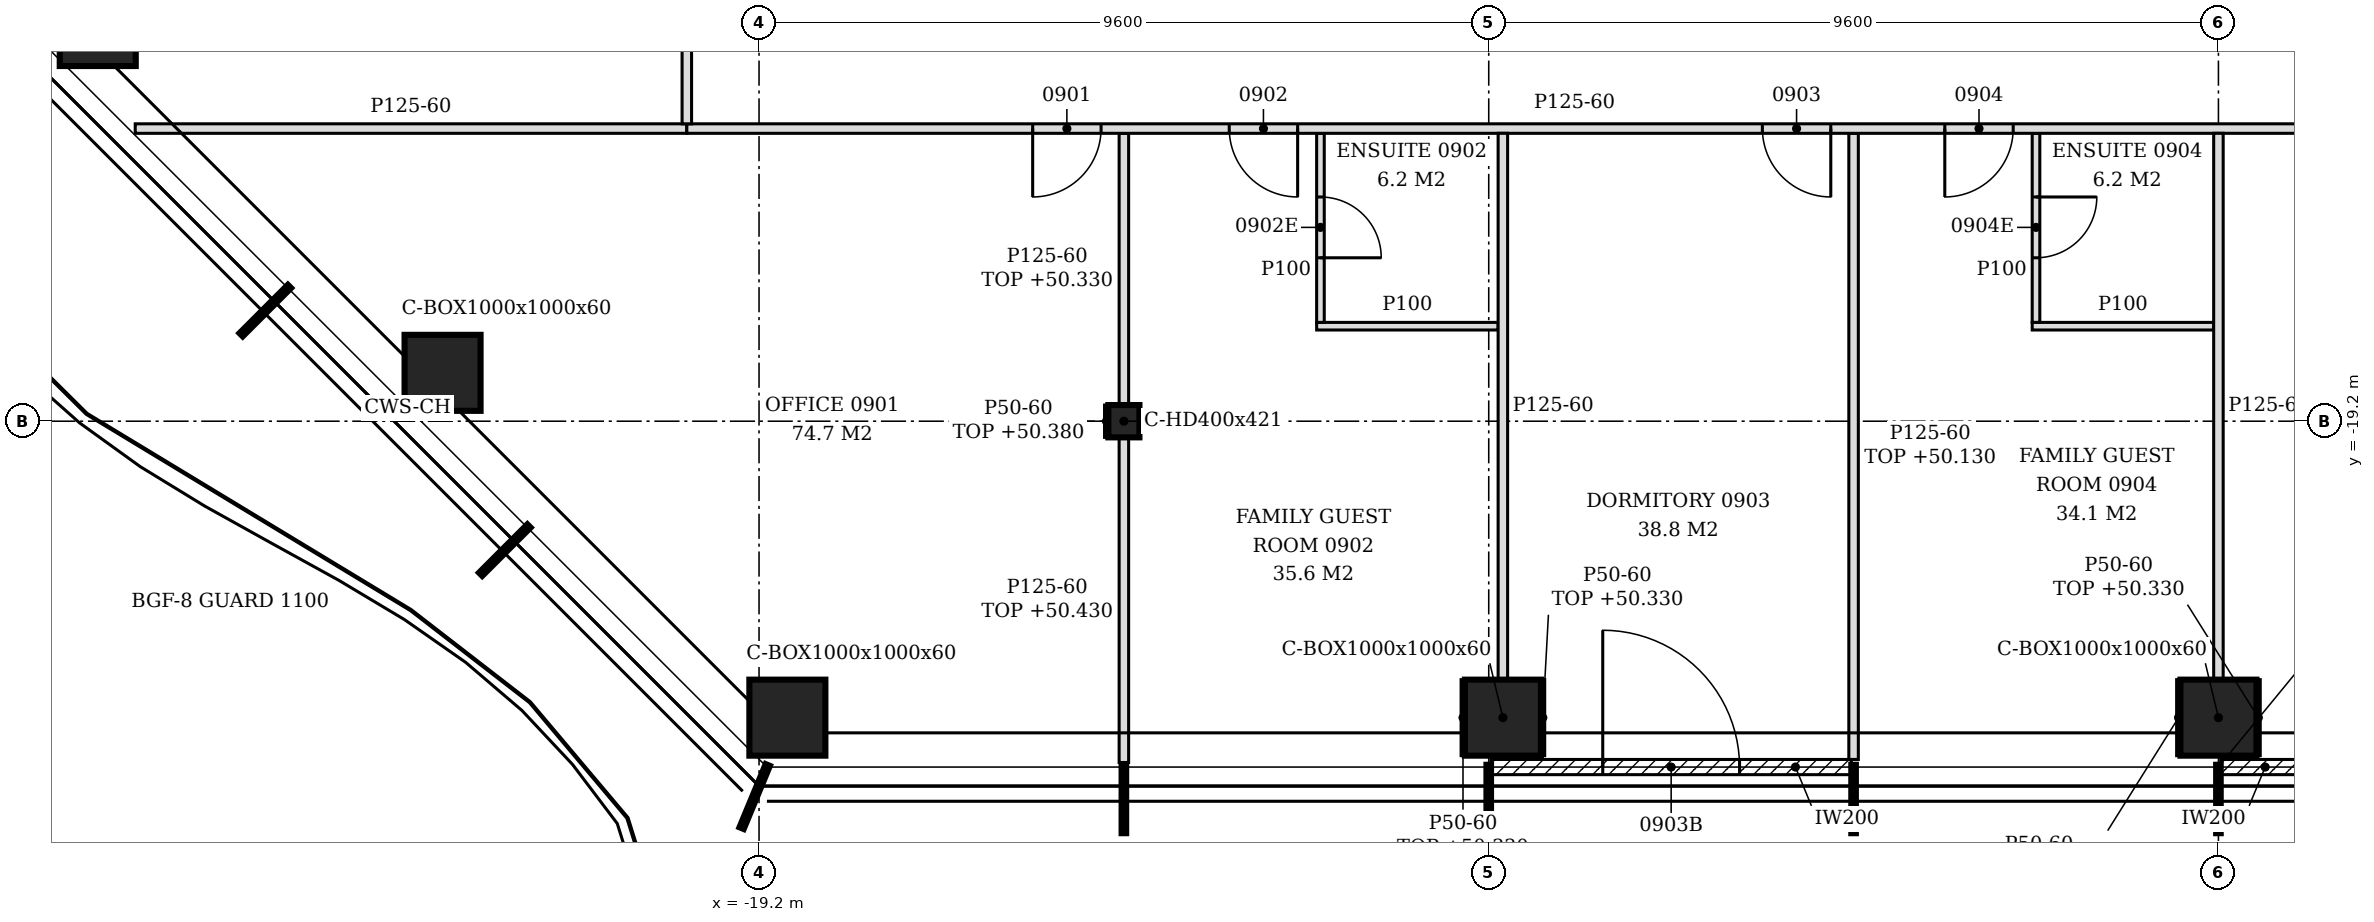
"""IFC4 building model, lengths in metres.
Left out: names, types, materials, properties, quantities, classifications, styles, units other than length and angle.
Written with IfcOpenShell. Run it as: python <this file> out.ifc"""

import sys

from ifc_helpers import new_model, si_unit, direction, frame, frame_2d, origin, origin_2d, place, context, subcontext, project, spatial, polyline, rectangle, hollow_rectangle, i_section, outline, extrude, element, fill, save


model = new_model("IFC4")
c1 = context("Model", 3, precision=1e-05, world=origin(), true_north=direction((0.0, 1.0)))
c2 = subcontext(c1, "Body", "Model", "MODEL_VIEW")
j1 = project(units=[si_unit("LENGTHUNIT", "METRE"), si_unit("PLANEANGLEUNIT", "RADIAN")], contexts=[c1])
p1 = place(None, origin())
s1 = spatial("IfcSite", under=j1, at=p1, CompositionType="ELEMENT")
p2 = place(p1, origin())
s2 = spatial("IfcBuilding", under=s1, at=p2, CompositionType="ELEMENT")
p3 = place(p2, frame((0.0, 0.0, 47.4)))
s3 = spatial("IfcBuildingStorey", under=s2, at=p3, CompositionType="ELEMENT", Elevation=47.4)
for number, where, z_axis, x_axis in (
    (1, (-18.827, -23.1, -0.15), (0.0, 0.0, 1.0), (1.0, 0.0, 0.0)),
    (2, (-9.414, -23.1, -0.15), (0.0, 0.0, 1.0), (1.0, 0.0, 0.0)),
    (3, (0.0, -23.1, -0.15), (0.0, 0.0, 1.0), (1.0, 0.0, 0.0)),
    (4, (-27.9, -14.027, -0.15), (0.0, 0.0, 1.0), (1.0, 0.0, 0.0)),
    (5, (-23.364, -18.564, -0.15), (0.0, 0.0, 1.0), (1.0, 0.0, 0.0)),
):
    element("IfcColumn", number, at=place(p3, frame(where, z_axis=z_axis, x_axis=x_axis)), inside=s3, PredefinedType="COLUMN", context=c2, shape_type="SweptSolid", body=[
        extrude(hollow_rectangle(XDim=1.0, YDim=1.0, WallThickness=0.06, at=origin_2d()), origin(), (0.0, 0.0, 1.0), 3.6),
    ])
p4 = place(p3, frame((-14.4, -19.2, -0.15), z_axis=(0.0, 0.0, 1.0), x_axis=(1.0, 0.0, 0.0)))
e6 = element("IfcColumn", 6, at=p4, inside=s3, PredefinedType="COLUMN", context=c2, shape_type="SweptSolid", body=[
    extrude(i_section(OverallWidth=0.409, OverallDepth=0.425, WebThickness=0.033, FlangeThickness=0.052, FilletRadius=0.015, at=origin_2d()), origin(), (0.0, 0.0, 1.0), 3.6),
])
p5 = place(p3, frame((-9.57, -23.75, 0.0), z_axis=(0.0, 0.0, 1.0), x_axis=(1.0, 0.0, 0.0)))
e7 = element("IfcWall", 7, at=p5, inside=s3, PredefinedType="NOTDEFINED", context=c2, shape_type="SweptSolid", body=[
    extrude(rectangle(XDim=4.74, YDim=0.2, at=frame_2d((2.37, 0.0))), origin(), (0.0, 0.0, 1.0), 3.45),
])
p6 = place(p5, frame((1.47, 0.0, 0.0)))
e8 = element("IfcOpeningElement", 8, at=p6, cuts=e7, PredefinedType="OPENING", context=c2, shape_type="SweptSolid", body=[
    extrude(rectangle(XDim=1.8, YDim=2.4, at=frame_2d((0.9, 1.2))), frame((0.0, 0.11, 0.0), z_axis=(0.0, -1.0, 0.0), x_axis=(1.0, 0.0, 0.0)), (0.0, 0.0, 1.0), 0.22),
])
p7 = place(p3, frame((0.03, -23.75, 0.0), z_axis=(0.0, 0.0, 1.0), x_axis=(1.0, 0.0, 0.0)))
e9 = element("IfcWall", 9, at=p7, inside=s3, PredefinedType="NOTDEFINED", context=c2, shape_type="SweptSolid", body=[
    extrude(rectangle(XDim=4.74, YDim=0.2, at=frame_2d((2.37, 0.0))), origin(), (0.0, 0.0, 1.0), 3.45),
])
p8 = place(p7, frame((1.17, 0.0, 0.0)))
e10 = element("IfcOpeningElement", 10, at=p8, cuts=e9, PredefinedType="OPENING", context=c2, shape_type="SweptSolid", body=[
    extrude(rectangle(XDim=2.4, YDim=2.4, at=frame_2d((1.2, 1.2))), frame((0.0, 0.11, 0.0), z_axis=(0.0, -1.0, 0.0), x_axis=(1.0, 0.0, 0.0)), (0.0, 0.0, 1.0), 0.22),
])
p9 = place(p3, frame((-14.4, -23.69, 0.0), z_axis=(0.0, 0.0, 1.0), x_axis=(0.0, 1.0, 0.0)))
e11 = element("IfcWall", 11, at=p9, inside=s3, PredefinedType="PARTITIONING", context=c2, shape_type="SweptSolid", body=[
    extrude(outline(polyline([(0.0, 0.0), (4.277, 0.0), (4.278, 3.03), (0.74, 3.03), (0.738, 2.93), (0.44, 2.93), (0.438, 3.03), (0.0, 3.03), (0.0, 0.0)])), frame((0.0, 0.062, 0.0), z_axis=(0.0, -1.0, 0.0), x_axis=(1.0, 0.0, 0.0)), (0.0, 0.0, 1.0), 0.125),
])
p10 = place(p3, frame((-4.8, -23.65, 0.0), z_axis=(0.0, 0.0, 1.0), x_axis=(0.0, 1.0, 0.0)))
e12 = element("IfcWall", 12, at=p10, inside=s3, PredefinedType="PARTITIONING", context=c2, shape_type="SweptSolid", body=[
    extrude(rectangle(XDim=8.237, YDim=0.125, at=frame_2d((4.119, 0.0))), origin(), (0.0, 0.0, 1.0), 2.73),
])
p11 = place(p3, frame((-9.414, -22.6, 0.0), z_axis=(0.0, 0.0, 1.0), x_axis=(0.0, 1.0, 0.0)))
e13 = element("IfcWall", 13, at=p11, inside=s3, PredefinedType="PARTITIONING", context=c2, shape_type="SweptSolid", body=[
    extrude(outline(polyline([(0.0, 0.0), (7.188, 0.0), (7.188, 3.45), (3.5, 3.45), (3.498, 2.93), (3.3, 2.93), (3.298, 3.45), (0.0, 3.45), (0.0, 0.0)])), frame((0.0, 0.062, 0.0), z_axis=(0.0, -1.0, 0.0), x_axis=(1.0, 0.0, 0.0)), (0.0, 0.0, 1.0), 0.125),
])
p12 = place(p3, frame((0.0, -22.6, 0.0), z_axis=(0.0, 0.0, 1.0), x_axis=(0.0, 1.0, 0.0)))
e14 = element("IfcWall", 14, at=p12, inside=s3, PredefinedType="PARTITIONING", context=c2, shape_type="SweptSolid", body=[
    extrude(outline(polyline([(0.0, 0.0), (7.188, 0.0), (7.188, 3.45), (3.505, 3.45), (3.503, 2.88), (3.295, 2.88), (3.293, 3.45), (0.0, 3.45), (0.0, 0.0)])), frame((0.0, 0.062, 0.0), z_axis=(0.0, -1.0, 0.0), x_axis=(1.0, 0.0, 0.0)), (0.0, 0.0, 1.0), 0.125),
])
p13 = place(p3, frame((-14.4, -18.988, 0.0), z_axis=(0.0, 0.0, 1.0), x_axis=(0.0, 1.0, 0.0)))
e15 = element("IfcWall", 15, at=p13, inside=s3, PredefinedType="PARTITIONING", context=c2, shape_type="SweptSolid", body=[
    extrude(rectangle(XDim=3.575, YDim=0.125, at=frame_2d((1.788, 0.0))), origin(), (0.0, 0.0, 1.0), 2.93),
])
p14 = place(p3, frame((-11.864, -17.95, 0.0), z_axis=(0.0, 0.0, 1.0), x_axis=(1.0, 0.0, 0.0)))
e16 = element("IfcWall", 16, at=p14, inside=s3, PredefinedType="PARTITIONING", context=c2, shape_type="SweptSolid", body=[
    extrude(rectangle(XDim=2.387, YDim=0.1, at=frame_2d((1.194, 0.0))), origin(), (0.0, 0.0, 1.0), 3.45),
])
p15 = place(p3, frame((-11.814, -17.9, 0.0), z_axis=(0.0, 0.0, 1.0), x_axis=(0.0, 1.0, 0.0)))
e17 = element("IfcWall", 17, at=p15, inside=s3, PredefinedType="PARTITIONING", context=c2, shape_type="SweptSolid", body=[
    extrude(rectangle(XDim=2.487, YDim=0.1, at=frame_2d((1.244, 0.0))), origin(), (0.0, 0.0, 1.0), 3.45),
])
p16 = place(p15, frame((0.85, 0.0, 0.0)))
e18 = element("IfcOpeningElement", 18, at=p16, cuts=e17, PredefinedType="OPENING", context=c2, shape_type="SweptSolid", body=[
    extrude(rectangle(XDim=0.8, YDim=2.1, at=frame_2d((0.4, 1.05))), frame((0.0, 0.06, 0.0), z_axis=(0.0, -1.0, 0.0), x_axis=(1.0, 0.0, 0.0)), (0.0, 0.0, 1.0), 0.12),
])
p17 = place(p3, frame((-2.45, -17.95, 0.0), z_axis=(0.0, 0.0, 1.0), x_axis=(1.0, 0.0, 0.0)))
e19 = element("IfcWall", 19, at=p17, inside=s3, PredefinedType="PARTITIONING", context=c2, shape_type="SweptSolid", body=[
    extrude(rectangle(XDim=2.387, YDim=0.1, at=frame_2d((1.194, 0.0))), origin(), (0.0, 0.0, 1.0), 3.45),
])
p18 = place(p3, frame((-2.4, -17.9, 0.0), z_axis=(0.0, 0.0, 1.0), x_axis=(0.0, 1.0, 0.0)))
e20 = element("IfcWall", 20, at=p18, inside=s3, PredefinedType="PARTITIONING", context=c2, shape_type="SweptSolid", body=[
    extrude(rectangle(XDim=2.487, YDim=0.1, at=frame_2d((1.244, 0.0))), origin(), (0.0, 0.0, 1.0), 3.45),
])
p19 = place(p18, frame((0.85, 0.0, 0.0)))
e21 = element("IfcOpeningElement", 21, at=p19, cuts=e20, PredefinedType="OPENING", context=c2, shape_type="SweptSolid", body=[
    extrude(rectangle(XDim=0.8, YDim=2.1, at=frame_2d((0.4, 1.05))), frame((0.0, 0.06, 0.0), z_axis=(0.0, -1.0, 0.0), x_axis=(1.0, 0.0, 0.0)), (0.0, 0.0, 1.0), 0.12),
])
p20 = place(p3, frame((-27.407, -15.35, 0.0), z_axis=(0.0, 0.0, 1.0), x_axis=(1.0, 0.0, 0.0)))
e22 = element("IfcWall", 22, at=p20, inside=s3, PredefinedType="PARTITIONING", context=c2, shape_type="SweptSolid", body=[
    extrude(outline(polyline([(0.0, 0.0), (7.257, 0.0), (7.257, 3.45), (1.104, 3.45), (1.102, 2.93), (0.555, 2.93), (0.553, 3.45), (0.0, 3.45), (0.0, 0.0)])), frame((0.0, 0.062, 0.0), z_axis=(0.0, -1.0, 0.0), x_axis=(1.0, 0.0, 0.0)), (0.0, 0.0, 1.0), 0.125),
])
p21 = place(p3, frame((-20.15, -15.35, 0.0), z_axis=(0.0, 0.0, 1.0), x_axis=(1.0, 0.0, 0.0)))
e23 = element("IfcWall", 23, at=p21, inside=s3, PredefinedType="PARTITIONING", context=c2, shape_type="SweptSolid", body=[
    extrude(outline(polyline([(0.0, 0.0), (39.287, 0.0), (39.288, 2.73), (39.2, 2.73), (39.198, 3.45), (27.5, 3.45), (27.498, 2.73), (27.2, 2.73), (27.198, 3.45), (15.5, 3.45), (15.498, 2.73), (15.2, 2.73), (15.198, 3.45), (5.9, 3.45), (5.898, 2.93), (5.6, 2.93), (5.598, 3.45), (0.0, 3.45), (0.0, 0.0)])), frame((0.0, 0.062, 0.0), z_axis=(0.0, -1.0, 0.0), x_axis=(1.0, 0.0, 0.0)), (0.0, 0.0, 1.0), 0.125),
])
p22 = place(p21, frame((4.55, 0.0, 0.0)))
e24 = element("IfcOpeningElement", 24, at=p22, cuts=e23, PredefinedType="OPENING", context=c2, shape_type="SweptSolid", body=[
    extrude(rectangle(XDim=0.9, YDim=2.1, at=frame_2d((0.45, 1.05))), frame((0.0, 0.073, 0.0), z_axis=(0.0, -1.0, 0.0), x_axis=(1.0, 0.0, 0.0)), (0.0, 0.0, 1.0), 0.145),
])
p23 = place(p21, frame((7.136, 0.0, 0.0)))
e25 = element("IfcOpeningElement", 25, at=p23, cuts=e23, PredefinedType="OPENING", context=c2, shape_type="SweptSolid", body=[
    extrude(rectangle(XDim=0.9, YDim=2.1, at=frame_2d((0.45, 1.05))), frame((0.0, 0.073, 0.0), z_axis=(0.0, -1.0, 0.0), x_axis=(1.0, 0.0, 0.0)), (0.0, 0.0, 1.0), 0.145),
])
p24 = place(p21, frame((14.15, 0.0, 0.0)))
e26 = element("IfcOpeningElement", 26, at=p24, cuts=e23, PredefinedType="OPENING", context=c2, shape_type="SweptSolid", body=[
    extrude(rectangle(XDim=0.9, YDim=2.1, at=frame_2d((0.45, 1.05))), frame((0.0, 0.073, 0.0), z_axis=(0.0, -1.0, 0.0), x_axis=(1.0, 0.0, 0.0)), (0.0, 0.0, 1.0), 0.145),
])
p25 = place(p21, frame((16.55, 0.0, 0.0)))
e27 = element("IfcOpeningElement", 27, at=p25, cuts=e23, PredefinedType="OPENING", context=c2, shape_type="SweptSolid", body=[
    extrude(rectangle(XDim=0.9, YDim=2.1, at=frame_2d((0.45, 1.05))), frame((0.0, 0.073, 0.0), z_axis=(0.0, -1.0, 0.0), x_axis=(1.0, 0.0, 0.0)), (0.0, 0.0, 1.0), 0.145),
])
p26 = place(p21, frame((21.35, 0.0, 0.0)))
e28 = element("IfcOpeningElement", 28, at=p26, cuts=e23, PredefinedType="OPENING", context=c2, shape_type="SweptSolid", body=[
    extrude(rectangle(XDim=0.9, YDim=2.1, at=frame_2d((0.45, 1.05))), frame((0.0, 0.073, 0.0), z_axis=(0.0, -1.0, 0.0), x_axis=(1.0, 0.0, 0.0)), (0.0, 0.0, 1.0), 0.145),
])
p27 = place(p21, frame((28.364, 0.0, 0.0)))
e29 = element("IfcOpeningElement", 29, at=p27, cuts=e23, PredefinedType="OPENING", context=c2, shape_type="SweptSolid", body=[
    extrude(rectangle(XDim=0.9, YDim=2.1, at=frame_2d((0.45, 1.05))), frame((0.0, 0.073, 0.0), z_axis=(0.0, -1.0, 0.0), x_axis=(1.0, 0.0, 0.0)), (0.0, 0.0, 1.0), 0.145),
])
p28 = place(p21, frame((32.35, 0.0, 0.0)))
e30 = element("IfcOpeningElement", 30, at=p28, cuts=e23, PredefinedType="OPENING", context=c2, shape_type="SweptSolid", body=[
    extrude(rectangle(XDim=0.9, YDim=2.1, at=frame_2d((0.45, 1.05))), frame((0.0, 0.073, 0.0), z_axis=(0.0, -1.0, 0.0), x_axis=(1.0, 0.0, 0.0)), (0.0, 0.0, 1.0), 0.145),
])
p29 = place(p21, frame((37.35, 0.0, 0.0)))
e31 = element("IfcOpeningElement", 31, at=p29, cuts=e23, PredefinedType="OPENING", context=c2, shape_type="SweptSolid", body=[
    extrude(rectangle(XDim=0.9, YDim=2.1, at=frame_2d((0.45, 1.05))), frame((0.0, 0.073, 0.0), z_axis=(0.0, -1.0, 0.0), x_axis=(1.0, 0.0, 0.0)), (0.0, 0.0, 1.0), 0.145),
])
p30 = place(p3, frame((-20.15, -15.288, 0.0), z_axis=(0.0, 0.0, 1.0), x_axis=(0.0, 1.0, 0.0)))
e32 = element("IfcWall", 32, at=p30, inside=s3, PredefinedType="PARTITIONING", context=c2, shape_type="SweptSolid", body=[
    extrude(outline(polyline([(0.0, 0.0), (37.876, 0.0), (37.876, 3.45), (37.622, 3.45), (37.62, 2.63), (36.507, 2.63), (36.505, 3.45), (34.583, 3.45), (34.581, 2.98), (34.393, 2.98), (34.39, 3.45), (29.798, 3.45), (29.795, 2.83), (29.577, 2.83), (29.575, 3.45), (24.998, 3.45), (24.996, 2.83), (24.778, 2.83), (24.775, 3.45), (20.198, 3.45), (20.196, 2.83), (19.978, 2.83), (19.976, 3.45), (15.397, 3.45), (15.396, 2.83), (15.177, 2.83), (15.176, 3.45), (10.597, 3.45), (10.595, 2.83), (10.377, 2.83), (10.375, 3.45), (5.798, 3.45), (5.795, 2.83), (5.577, 2.83), (5.575, 3.45), (0.998, 3.45), (0.996, 2.83), (0.778, 2.83), (0.775, 3.45), (0.0, 3.45), (0.0, 0.0)])), frame((0.0, 0.062, 0.0), z_axis=(0.0, -1.0, 0.0), x_axis=(1.0, 0.0, 0.0)), (0.0, 0.0, 1.0), 0.125),
])
p31 = place(p30, frame((9.337, 0.0, 0.0)))
e33 = element("IfcOpeningElement", 33, at=p31, cuts=e32, PredefinedType="OPENING", context=c2, shape_type="SweptSolid", body=[
    extrude(rectangle(XDim=0.9, YDim=2.1, at=frame_2d((0.45, 1.05))), frame((0.0, 0.073, 0.0), z_axis=(0.0, -1.0, 0.0), x_axis=(1.0, 0.0, 0.0)), (0.0, 0.0, 1.0), 0.145),
])
p32 = place(p30, frame((10.912, 0.0, 0.0)))
e34 = element("IfcOpeningElement", 34, at=p32, cuts=e32, PredefinedType="OPENING", context=c2, shape_type="SweptSolid", body=[
    extrude(rectangle(XDim=0.9, YDim=2.1, at=frame_2d((0.45, 1.05))), frame((0.0, 0.073, 0.0), z_axis=(0.0, -1.0, 0.0), x_axis=(1.0, 0.0, 0.0)), (0.0, 0.0, 1.0), 0.145),
])
p33 = place(p30, frame((16.488, 0.0, 0.0)))
e35 = element("IfcOpeningElement", 35, at=p33, cuts=e32, PredefinedType="OPENING", context=c2, shape_type="SweptSolid", body=[
    extrude(rectangle(XDim=0.9, YDim=2.1, at=frame_2d((0.45, 1.05))), frame((0.0, 0.073, 0.0), z_axis=(0.0, -1.0, 0.0), x_axis=(1.0, 0.0, 0.0)), (0.0, 0.0, 1.0), 0.145),
])
p34 = place(p30, frame((23.664, 0.0, 0.0)))
e36 = element("IfcOpeningElement", 36, at=p34, cuts=e32, PredefinedType="OPENING", context=c2, shape_type="SweptSolid", body=[
    extrude(rectangle(XDim=0.9, YDim=2.1, at=frame_2d((0.45, 1.05))), frame((0.0, 0.073, 0.0), z_axis=(0.0, -1.0, 0.0), x_axis=(1.0, 0.0, 0.0)), (0.0, 0.0, 1.0), 0.145),
])
p35 = place(p30, frame((26.387, 0.0, 0.0)))
e37 = element("IfcOpeningElement", 37, at=p35, cuts=e32, PredefinedType="OPENING", context=c2, shape_type="SweptSolid", body=[
    extrude(rectangle(XDim=0.9, YDim=2.1, at=frame_2d((0.45, 1.05))), frame((0.0, 0.073, 0.0), z_axis=(0.0, -1.0, 0.0), x_axis=(1.0, 0.0, 0.0)), (0.0, 0.0, 1.0), 0.145),
])
p36 = place(p30, frame((29.615, 0.0, 0.0)))
e38 = element("IfcOpeningElement", 38, at=p36, cuts=e32, PredefinedType="OPENING", context=c2, shape_type="SweptSolid", body=[
    extrude(rectangle(XDim=0.9, YDim=2.1, at=frame_2d((0.45, 1.05))), frame((0.0, 0.073, 0.0), z_axis=(0.0, -1.0, 0.0), x_axis=(1.0, 0.0, 0.0)), (0.0, 0.0, 1.0), 0.145),
])
p37 = place(p3, frame((-14.629, -19.413, 0.0), z_axis=(0.0, 0.0, 1.0), x_axis=(0.0, 1.0, 0.0)))
e39 = element("IfcWall", 39, at=p37, inside=s3, PredefinedType="PARTITIONING", context=c2, shape_type="SweptSolid", body=[
    extrude(rectangle(XDim=0.425, YDim=0.05, at=frame_2d((0.212, 0.0))), origin(), (0.0, 0.0, 1.0), 2.98),
])
for number, where, z_axis, x_axis in (
    (40, (-0.525, -23.6, 0.0), (0.0, 0.0, 1.0), (0.0, 1.0, 0.0)),
    (41, (0.525, -23.6, 0.0), (0.0, 0.0, 1.0), (0.0, 1.0, 0.0)),
    (42, (-9.939, -23.6, 0.0), (0.0, 0.0, 1.0), (0.0, 1.0, 0.0)),
    (43, (-8.889, -23.6, 0.0), (0.0, 0.0, 1.0), (0.0, 1.0, 0.0)),
):
    element("IfcWall", number, at=place(p3, frame(where, z_axis=z_axis, x_axis=x_axis)), inside=s3, PredefinedType="PARTITIONING", context=c2, shape_type="SweptSolid", body=[
        extrude(rectangle(XDim=1.0, YDim=0.05, at=frame_2d((0.5, 0.0))), origin(), (0.0, 0.0, 1.0), 2.93),
    ])
p38 = place(p6, origin())
e44 = element("IfcDoor", 44, at=p38, inside=s3, OperationType="SINGLE_SWING_LEFT", PredefinedType="DOOR", context=c2, shape_type="SweptSolid", body=[
    extrude(rectangle(XDim=1.8, YDim=2.4, at=frame_2d((0.9, 1.2))), frame((0.0, 0.025, 0.0), z_axis=(0.0, -1.0, 0.0), x_axis=(1.0, 0.0, 0.0)), (0.0, 0.0, 1.0), 0.05),
])
fill(e8, e44)
p39 = place(p22, frame((0.9, 0.0, 0.0), z_axis=(0.0, 0.0, 1.0), x_axis=(-1.0, 0.0, 0.0)))
e45 = element("IfcDoor", 45, at=p39, inside=s3, OperationType="SINGLE_SWING_RIGHT", PredefinedType="DOOR", context=c2, shape_type="SweptSolid", body=[
    extrude(rectangle(XDim=0.9, YDim=2.1, at=frame_2d((0.45, 1.05))), frame((0.0, 0.025, 0.0), z_axis=(0.0, -1.0, 0.0), x_axis=(1.0, 0.0, 0.0)), (0.0, 0.0, 1.0), 0.05),
])
fill(e24, e45)
p40 = place(p23, frame((0.9, 0.0, 0.0), z_axis=(0.0, 0.0, 1.0), x_axis=(-1.0, 0.0, 0.0)))
e46 = element("IfcDoor", 46, at=p40, inside=s3, OperationType="SINGLE_SWING_LEFT", PredefinedType="DOOR", context=c2, shape_type="SweptSolid", body=[
    extrude(rectangle(XDim=0.9, YDim=2.1, at=frame_2d((0.45, 1.05))), frame((0.0, 0.025, 0.0), z_axis=(0.0, -1.0, 0.0), x_axis=(1.0, 0.0, 0.0)), (0.0, 0.0, 1.0), 0.05),
])
fill(e25, e46)
p41 = place(p16, frame((0.8, 0.0, 0.0), z_axis=(0.0, 0.0, 1.0), x_axis=(-1.0, 0.0, 0.0)))
e47 = element("IfcDoor", 47, at=p41, inside=s3, OperationType="SINGLE_SWING_RIGHT", PredefinedType="DOOR", context=c2, shape_type="SweptSolid", body=[
    extrude(rectangle(XDim=0.8, YDim=2.1, at=frame_2d((0.4, 1.05))), frame((0.0, 0.025, 0.0), z_axis=(0.0, -1.0, 0.0), x_axis=(1.0, 0.0, 0.0)), (0.0, 0.0, 1.0), 0.05),
])
fill(e18, e47)
p42 = place(p24, frame((0.9, 0.0, 0.0), z_axis=(0.0, 0.0, 1.0), x_axis=(-1.0, 0.0, 0.0)))
e48 = element("IfcDoor", 48, at=p42, inside=s3, OperationType="SINGLE_SWING_LEFT", PredefinedType="DOOR", context=c2, shape_type="SweptSolid", body=[
    extrude(rectangle(XDim=0.9, YDim=2.1, at=frame_2d((0.45, 1.05))), frame((0.0, 0.025, 0.0), z_axis=(0.0, -1.0, 0.0), x_axis=(1.0, 0.0, 0.0)), (0.0, 0.0, 1.0), 0.05),
])
fill(e26, e48)
p43 = place(p25, frame((0.9, 0.0, 0.0), z_axis=(0.0, 0.0, 1.0), x_axis=(-1.0, 0.0, 0.0)))
e49 = element("IfcDoor", 49, at=p43, inside=s3, OperationType="SINGLE_SWING_RIGHT", PredefinedType="DOOR", context=c2, shape_type="SweptSolid", body=[
    extrude(rectangle(XDim=0.9, YDim=2.1, at=frame_2d((0.45, 1.05))), frame((0.0, 0.025, 0.0), z_axis=(0.0, -1.0, 0.0), x_axis=(1.0, 0.0, 0.0)), (0.0, 0.0, 1.0), 0.05),
])
fill(e27, e49)
p44 = place(p19, frame((0.8, 0.0, 0.0), z_axis=(0.0, 0.0, 1.0), x_axis=(-1.0, 0.0, 0.0)))
e50 = element("IfcDoor", 50, at=p44, inside=s3, OperationType="SINGLE_SWING_LEFT", PredefinedType="DOOR", context=c2, shape_type="SweptSolid", body=[
    extrude(rectangle(XDim=0.8, YDim=2.1, at=frame_2d((0.4, 1.05))), frame((0.0, 0.025, 0.0), z_axis=(0.0, -1.0, 0.0), x_axis=(1.0, 0.0, 0.0)), (0.0, 0.0, 1.0), 0.05),
])
fill(e21, e50)
save(model, sys.argv[1])
